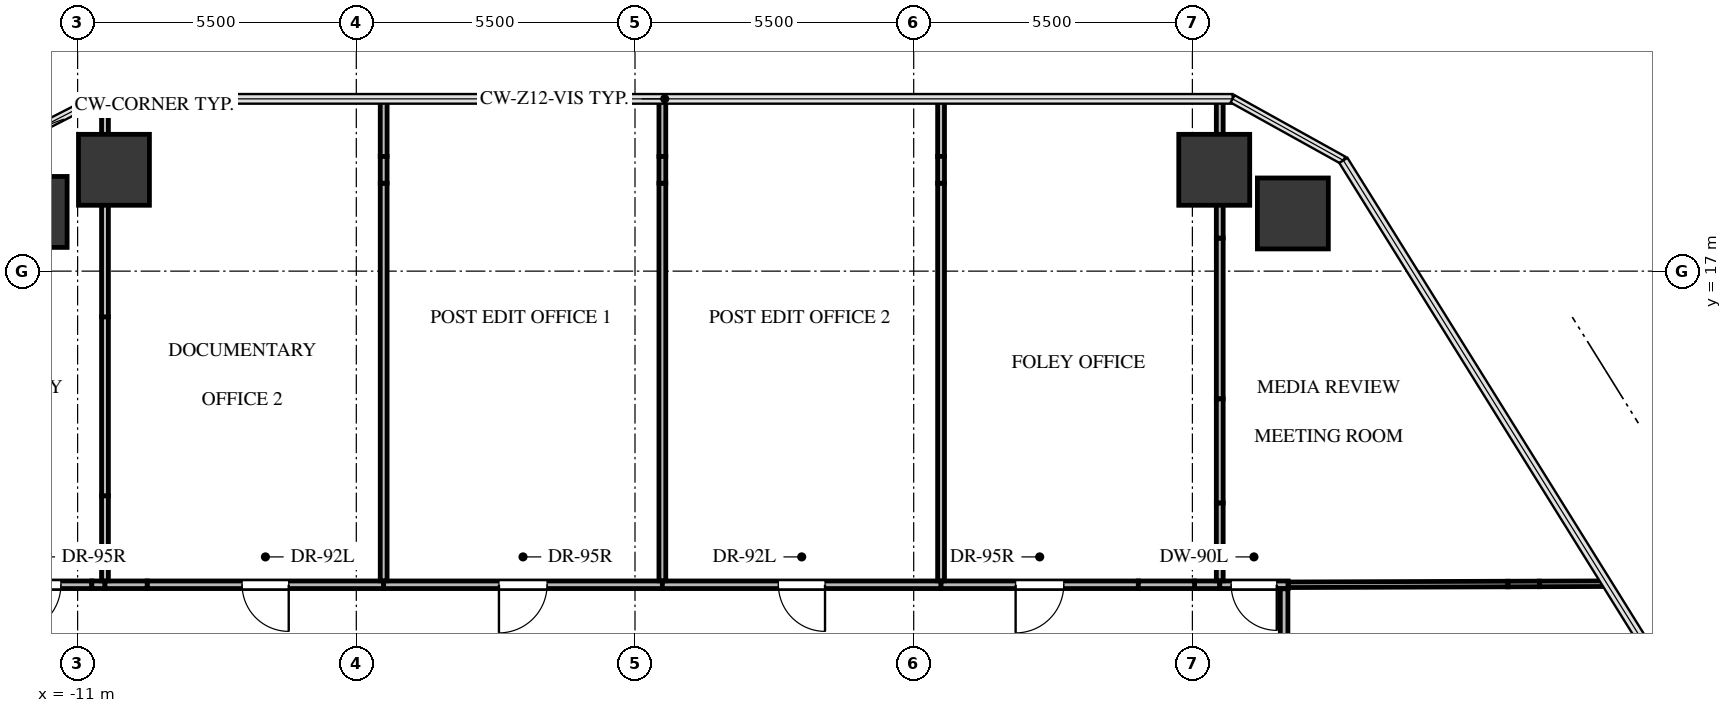
"""IFC4 building model, lengths in metres.
Left out: names, types, materials, properties, quantities, classifications, styles, units other than length and angle.
Written with IfcOpenShell. Run it as: python <this file> out.ifc"""

import sys

from ifc_helpers import new_model, si_unit, direction, frame, frame_2d, origin, origin_2d, place, context, subcontext, project, spatial, rectangle, extrude, source, transform, mapped, element, fill, save


model = new_model("IFC4")
c1 = context("Model", 3, precision=1e-05, world=origin(), true_north=direction((0.0, 1.0)))
c2 = subcontext(c1, "Body", "Model", "MODEL_VIEW")
j1 = project(units=[si_unit("LENGTHUNIT", "METRE"), si_unit("PLANEANGLEUNIT", "RADIAN")], contexts=[c1])
p1 = place(None, origin())
s1 = spatial("IfcSite", under=j1, at=p1, CompositionType="ELEMENT")
p2 = place(p1, origin())
s2 = spatial("IfcBuilding", under=s1, at=p2, CompositionType="ELEMENT")
p3 = place(p2, frame((0.0, 0.0, 75.3)))
s3 = spatial("IfcBuildingStorey", under=s2, at=p3, CompositionType="ELEMENT", Elevation=75.3)
m1 = source(origin(), c2, "Body", "SweptSolid", [
    extrude(rectangle(XDim=1.4, YDim=1.4, at=origin_2d()), origin(), (0.0, 0.0, 1.0), 3.0),
])
for number, where, z_axis, x_axis in (
    (1, (-11.907, 18.168, -0.24), (0.0, 0.0, 1.0), (1.0, 0.0, 0.0)),
    (2, (-10.283, 19.0, -0.24), (0.0, 0.0, 1.0), (1.0, 0.0, 0.0)),
    (3, (11.431, 19.0, -0.24), (0.0, 0.0, 1.0), (1.0, 0.0, 0.0)),
    (4, (12.983, 18.138, -0.24), (0.0, 0.0, 1.0), (1.0, 0.0, 0.0)),
):
    element("IfcColumn", number, at=place(p3, frame(where, z_axis=z_axis, x_axis=x_axis)), inside=s3, PredefinedType="COLUMN", context=c2, shape_type="MappedRepresentation", body=[
        mapped(m1, transform((0.0, 0.0, 0.0), x_axis=(1.0, 0.0, 0.0), y_axis=(0.0, 1.0, 0.0), z_axis=(0.0, 0.0, 1.0), scale=1.0)),
    ])
p4 = place(p3, frame((-10.72, 10.81, 0.0), z_axis=(0.0, 0.0, 1.0), x_axis=(-1.0, 0.0, 0.0)))
e5 = element("IfcWall", 5, at=p4, inside=s3, PredefinedType="PARTITIONING", context=c2, shape_type="SweptSolid", body=[
    extrude(rectangle(XDim=2.17, YDim=0.15, at=frame_2d((1.085, 0.0))), origin(), (0.0, 0.0, 1.0), 2.745),
])
p5 = place(p4, frame((0.61, 0.0, 0.0)))
e6 = element("IfcOpeningElement", 6, at=p5, cuts=e5, PredefinedType="OPENING", context=c2, shape_type="SweptSolid", body=[
    extrude(rectangle(XDim=0.95, YDim=2.1, at=frame_2d((0.475, 1.05))), frame((0.0, 0.085, 0.0), z_axis=(0.0, -1.0, 0.0), x_axis=(1.0, 0.0, 0.0)), (0.0, 0.0, 1.0), 0.17),
])
p6 = place(p3, frame((-10.46, 10.81, 0.0), z_axis=(0.0, 0.0, 1.0), x_axis=(-1.0, 0.0, 0.0)))
e7 = element("IfcWall", 7, at=p6, inside=s3, PredefinedType="PARTITIONING", context=c2, shape_type="SweptSolid", body=[
    extrude(rectangle(XDim=0.26, YDim=0.15, at=frame_2d((0.13, 0.0))), origin(), (0.0, 0.0, 1.0), 1.83),
])
p7 = place(p3, frame((-4.96, 10.81, 0.0), z_axis=(0.0, 0.0, 1.0), x_axis=(-1.0, 0.0, 0.0)))
e8 = element("IfcWall", 8, at=p7, inside=s3, PredefinedType="PARTITIONING", context=c2, shape_type="SweptSolid", body=[
    extrude(rectangle(XDim=4.667, YDim=0.15, at=frame_2d((2.334, 0.0))), origin(), (0.0, 0.0, 1.0), 2.298),
])
p8 = place(p7, frame((1.874, 0.0, 0.0)))
e9 = element("IfcOpeningElement", 9, at=p8, cuts=e8, PredefinedType="OPENING", context=c2, shape_type="SweptSolid", body=[
    extrude(rectangle(XDim=0.92, YDim=2.1, at=frame_2d((0.46, 1.05))), frame((0.0, 0.085, 0.0), z_axis=(0.0, -1.0, 0.0), x_axis=(1.0, 0.0, 0.0)), (0.0, 0.0, 1.0), 0.17),
])
p9 = place(p3, frame((-9.627, 10.81, 0.0), z_axis=(0.0, 0.0, 1.0), x_axis=(-1.0, 0.0, 0.0)))
e10 = element("IfcWall", 10, at=p9, inside=s3, PredefinedType="PARTITIONING", context=c2, shape_type="SweptSolid", body=[
    extrude(rectangle(XDim=0.833, YDim=0.15, at=frame_2d((0.416, 0.0))), origin(), (0.0, 0.0, 1.0), 1.83),
])
p10 = place(p3, frame((0.54, 10.81, 0.0), z_axis=(0.0, 0.0, 1.0), x_axis=(-1.0, 0.0, 0.0)))
e11 = element("IfcWall", 11, at=p10, inside=s3, PredefinedType="PARTITIONING", context=c2, shape_type="SweptSolid", body=[
    extrude(rectangle(XDim=5.5, YDim=0.15, at=frame_2d((2.75, 0.0))), origin(), (0.0, 0.0, 1.0), 2.745),
])
p11 = place(p10, frame((2.275, 0.0, 0.0)))
e12 = element("IfcOpeningElement", 12, at=p11, cuts=e11, PredefinedType="OPENING", context=c2, shape_type="SweptSolid", body=[
    extrude(rectangle(XDim=0.95, YDim=2.1, at=frame_2d((0.475, 1.05))), frame((0.0, 0.085, 0.0), z_axis=(0.0, -1.0, 0.0), x_axis=(1.0, 0.0, 0.0)), (0.0, 0.0, 1.0), 0.17),
])
p12 = place(p3, frame((6.04, 10.81, 0.0), z_axis=(0.0, 0.0, 1.0), x_axis=(-1.0, 0.0, 0.0)))
e13 = element("IfcWall", 13, at=p12, inside=s3, PredefinedType="PARTITIONING", context=c2, shape_type="SweptSolid", body=[
    extrude(rectangle(XDim=5.5, YDim=0.15, at=frame_2d((2.75, 0.0))), origin(), (0.0, 0.0, 1.0), 2.298),
])
p13 = place(p12, frame((2.29, 0.0, 0.0)))
e14 = element("IfcOpeningElement", 14, at=p13, cuts=e13, PredefinedType="OPENING", context=c2, shape_type="SweptSolid", body=[
    extrude(rectangle(XDim=0.92, YDim=2.1, at=frame_2d((0.46, 1.05))), frame((0.0, 0.085, 0.0), z_axis=(0.0, -1.0, 0.0), x_axis=(1.0, 0.0, 0.0)), (0.0, 0.0, 1.0), 0.17),
])
p14 = place(p3, frame((11.54, 10.81, 0.0), z_axis=(0.0, 0.0, 1.0), x_axis=(-1.0, 0.0, 0.0)))
e15 = element("IfcWall", 15, at=p14, inside=s3, PredefinedType="PARTITIONING", context=c2, shape_type="SweptSolid", body=[
    extrude(rectangle(XDim=0.498, YDim=0.15, at=frame_2d((0.249, 0.0))), origin(), (0.0, 0.0, 1.0), 2.745),
])
p15 = place(p3, frame((9.933, 10.81, 0.0), z_axis=(0.0, 0.0, 1.0), x_axis=(-1.0, 0.0, 0.0)))
e16 = element("IfcWall", 16, at=p15, inside=s3, PredefinedType="PARTITIONING", context=c2, shape_type="SweptSolid", body=[
    extrude(rectangle(XDim=3.893, YDim=0.15, at=frame_2d((1.947, 0.0))), origin(), (0.0, 0.0, 1.0), 2.745),
])
p16 = place(p15, frame((1.472, 0.0, 0.0)))
e17 = element("IfcOpeningElement", 17, at=p16, cuts=e16, PredefinedType="OPENING", context=c2, shape_type="SweptSolid", body=[
    extrude(rectangle(XDim=0.95, YDim=2.1, at=frame_2d((0.475, 1.05))), frame((0.0, 0.085, 0.0), z_axis=(0.0, -1.0, 0.0), x_axis=(1.0, 0.0, 0.0)), (0.0, 0.0, 1.0), 0.17),
])
p17 = place(p3, frame((11.042, 10.81, 0.0), z_axis=(0.0, 0.0, 1.0), x_axis=(-1.0, 0.0, 0.0)))
e18 = element("IfcWall", 18, at=p17, inside=s3, PredefinedType="PARTITIONING", context=c2, shape_type="SweptSolid", body=[
    extrude(rectangle(XDim=1.109, YDim=0.15, at=frame_2d((0.555, 0.0))), origin(), (0.0, 0.0, 1.0), 1.83),
])
p18 = place(p3, frame((12.89, 10.81, 0.0), z_axis=(0.0, 0.0, 1.0), x_axis=(-1.0, 0.0, 0.0)))
e19 = element("IfcWall", 19, at=p18, inside=s3, PredefinedType="PARTITIONING", context=c2, shape_type="SweptSolid", body=[
    extrude(rectangle(XDim=1.35, YDim=0.15, at=frame_2d((0.675, 0.0))), origin(), (0.0, 0.0, 1.0), 2.745),
])
p19 = place(p18, frame((0.225, 0.0, 0.0)))
e20 = element("IfcOpeningElement", 20, at=p19, cuts=e19, PredefinedType="OPENING", context=c2, shape_type="SweptSolid", body=[
    extrude(rectangle(XDim=0.9, YDim=2.05, at=frame_2d((0.45, 1.025))), frame((0.0, 0.085, 0.0), z_axis=(0.0, -1.0, 0.0), x_axis=(1.0, 0.0, 0.0)), (0.0, 0.0, 1.0), 0.17),
])
p20 = place(p3, frame((12.81, 4.54, 0.0), z_axis=(0.0, 0.0, 1.0), x_axis=(0.0, 1.0, 0.0)))
e21 = element("IfcWall", 21, at=p20, inside=s3, PredefinedType="PARTITIONING", context=c2, shape_type="SweptSolid", body=[
    extrude(rectangle(XDim=6.191, YDim=0.15, at=frame_2d((3.095, 0.0))), origin(), (0.0, 0.0, 1.0), 2.745),
])
p21 = place(p20, frame((2.646, 0.0, 0.0)))
e22 = element("IfcOpeningElement", 22, at=p21, cuts=e21, PredefinedType="OPENING", context=c2, shape_type="SweptSolid", body=[
    extrude(rectangle(XDim=0.9, YDim=2.05, at=frame_2d((0.45, 1.025))), frame((0.0, 0.085, 0.0), z_axis=(0.0, -1.0, 0.0), x_axis=(1.0, 0.0, 0.0)), (0.0, 0.0, 1.0), 0.17),
])
p22 = place(p3, frame((-10.46, 16.098, 0.0), z_axis=(0.0, 0.0, 1.0), x_axis=(0.0, -1.0, 0.0)))
e23 = element("IfcWall", 23, at=p22, inside=s3, PredefinedType="PARTITIONING", context=c2, shape_type="SweptSolid", body=[
    extrude(rectangle(XDim=3.535, YDim=0.135, at=frame_2d((1.768, 0.0))), origin(), (0.0, 0.0, 1.0), 1.83),
])
p23 = place(p3, frame((-10.46, 20.4, 0.0), z_axis=(0.0, 0.0, 1.0), x_axis=(0.0, -1.0, 0.0)))
e24 = element("IfcWall", 24, at=p23, inside=s3, PredefinedType="PARTITIONING", context=c2, shape_type="SweptSolid", body=[
    extrude(rectangle(XDim=4.302, YDim=0.135, at=frame_2d((2.151, 0.0))), origin(), (0.0, 0.0, 1.0), 1.577),
])
p24 = place(p3, frame((-10.46, 12.563, 0.0), z_axis=(0.0, 0.0, 1.0), x_axis=(0.0, -1.0, 0.0)))
e25 = element("IfcWall", 25, at=p24, inside=s3, PredefinedType="PARTITIONING", context=c2, shape_type="SweptSolid", body=[
    extrude(rectangle(XDim=1.675, YDim=0.135, at=frame_2d((0.837, 0.0))), origin(), (0.0, 0.0, 1.0), 1.83),
])
p25 = place(p3, frame((-4.96, 20.4, 0.0), z_axis=(0.0, 0.0, 1.0), x_axis=(0.0, -1.0, 0.0)))
e26 = element("IfcWall", 26, at=p25, inside=s3, PredefinedType="PARTITIONING", context=c2, shape_type="SweptSolid", body=[
    extrude(rectangle(XDim=1.135, YDim=0.135, at=frame_2d((0.568, 0.0))), origin(), (0.0, 0.0, 1.0), 2.745),
])
p26 = place(p3, frame((-4.96, 18.736, 0.0), z_axis=(0.0, 0.0, 1.0), x_axis=(0.0, -1.0, 0.0)))
e27 = element("IfcWall", 27, at=p26, inside=s3, PredefinedType="PARTITIONING", context=c2, shape_type="SweptSolid", body=[
    extrude(rectangle(XDim=7.847, YDim=0.135, at=frame_2d((3.923, 0.0))), origin(), (0.0, 0.0, 1.0), 2.745),
])
p27 = place(p3, frame((-4.96, 19.264, 0.0), z_axis=(0.0, 0.0, 1.0), x_axis=(0.0, -1.0, 0.0)))
e28 = element("IfcWall", 28, at=p27, inside=s3, PredefinedType="PARTITIONING", context=c2, shape_type="SweptSolid", body=[
    extrude(rectangle(XDim=0.529, YDim=0.135, at=frame_2d((0.264, 0.0))), origin(), (0.0, 0.0, 1.0), 2.08),
])
p28 = place(p3, frame((0.54, 20.4, 0.0), z_axis=(0.0, 0.0, 1.0), x_axis=(0.0, -1.0, 0.0)))
e29 = element("IfcWall", 29, at=p28, inside=s3, PredefinedType="PARTITIONING", context=c2, shape_type="SweptSolid", body=[
    extrude(rectangle(XDim=1.135, YDim=0.135, at=frame_2d((0.568, 0.0))), origin(), (0.0, 0.0, 1.0), 2.745),
])
p29 = place(p3, frame((0.54, 18.736, 0.0), z_axis=(0.0, 0.0, 1.0), x_axis=(0.0, -1.0, 0.0)))
e30 = element("IfcWall", 30, at=p29, inside=s3, PredefinedType="PARTITIONING", context=c2, shape_type="SweptSolid", body=[
    extrude(rectangle(XDim=7.847, YDim=0.135, at=frame_2d((3.923, 0.0))), origin(), (0.0, 0.0, 1.0), 2.745),
])
p30 = place(p3, frame((0.54, 19.264, 0.0), z_axis=(0.0, 0.0, 1.0), x_axis=(0.0, -1.0, 0.0)))
e31 = element("IfcWall", 31, at=p30, inside=s3, PredefinedType="PARTITIONING", context=c2, shape_type="SweptSolid", body=[
    extrude(rectangle(XDim=0.529, YDim=0.135, at=frame_2d((0.264, 0.0))), origin(), (0.0, 0.0, 1.0), 2.08),
])
p31 = place(p3, frame((6.04, 20.4, 0.0), z_axis=(0.0, 0.0, 1.0), x_axis=(0.0, -1.0, 0.0)))
e32 = element("IfcWall", 32, at=p31, inside=s3, PredefinedType="PARTITIONING", context=c2, shape_type="SweptSolid", body=[
    extrude(rectangle(XDim=1.135, YDim=0.135, at=frame_2d((0.568, 0.0))), origin(), (0.0, 0.0, 1.0), 2.745),
])
p32 = place(p3, frame((6.04, 18.736, 0.0), z_axis=(0.0, 0.0, 1.0), x_axis=(0.0, -1.0, 0.0)))
e33 = element("IfcWall", 33, at=p32, inside=s3, PredefinedType="PARTITIONING", context=c2, shape_type="SweptSolid", body=[
    extrude(rectangle(XDim=7.847, YDim=0.135, at=frame_2d((3.923, 0.0))), origin(), (0.0, 0.0, 1.0), 2.745),
])
p33 = place(p3, frame((6.04, 19.264, 0.0), z_axis=(0.0, 0.0, 1.0), x_axis=(0.0, -1.0, 0.0)))
e34 = element("IfcWall", 34, at=p33, inside=s3, PredefinedType="PARTITIONING", context=c2, shape_type="SweptSolid", body=[
    extrude(rectangle(XDim=0.529, YDim=0.135, at=frame_2d((0.264, 0.0))), origin(), (0.0, 0.0, 1.0), 2.08),
])
p34 = place(p3, frame((11.54, 17.652, 0.0), z_axis=(0.0, 0.0, 1.0), x_axis=(0.0, -1.0, 0.0)))
e35 = element("IfcWall", 35, at=p34, inside=s3, PredefinedType="PARTITIONING", context=c2, shape_type="SweptSolid", body=[
    extrude(rectangle(XDim=3.173, YDim=0.135, at=frame_2d((1.586, 0.0))), origin(), (0.0, 0.0, 1.0), 1.83),
])
p35 = place(p3, frame((11.54, 12.426, 0.0), z_axis=(0.0, 0.0, 1.0), x_axis=(0.0, -1.0, 0.0)))
e36 = element("IfcWall", 36, at=p35, inside=s3, PredefinedType="PARTITIONING", context=c2, shape_type="SweptSolid", body=[
    extrude(rectangle(XDim=1.537, YDim=0.135, at=frame_2d((0.768, 0.0))), origin(), (0.0, 0.0, 1.0), 1.83),
])
p36 = place(p3, frame((11.54, 20.4, 0.0), z_axis=(0.0, 0.0, 1.0), x_axis=(0.0, -1.0, 0.0)))
e37 = element("IfcWall", 37, at=p36, inside=s3, PredefinedType="PARTITIONING", context=c2, shape_type="SweptSolid", body=[
    extrude(rectangle(XDim=2.748, YDim=0.135, at=frame_2d((1.374, 0.0))), origin(), (0.0, 0.0, 1.0), 1.577),
])
p37 = place(p3, frame((11.54, 14.479, 0.0), z_axis=(0.0, 0.0, 1.0), x_axis=(0.0, -1.0, 0.0)))
e38 = element("IfcWall", 38, at=p37, inside=s3, PredefinedType="PARTITIONING", context=c2, shape_type="SweptSolid", body=[
    extrude(rectangle(XDim=2.053, YDim=0.135, at=frame_2d((1.026, 0.0))), origin(), (0.0, 0.0, 1.0), 1.83),
])
p38 = place(p3, frame((19.182, 10.831, 0.0), z_axis=(0.0, 0.0, 1.0), x_axis=(-0.999994579825, -0.00329246432, 0.0)))
e39 = element("IfcWall", 39, at=p38, inside=s3, PredefinedType="MOVABLE", context=c2, shape_type="SweptSolid", body=[
    extrude(rectangle(XDim=1.335, YDim=0.11, at=frame_2d((0.667, 0.0))), origin(), (0.0, 0.0, 1.0), 2.745),
])
p39 = place(p3, frame((17.225, 10.825, 0.0), z_axis=(0.0, 0.0, 1.0), x_axis=(-0.999994480721, -0.003322427884, 0.0)))
e40 = element("IfcWall", 40, at=p39, inside=s3, PredefinedType="MOVABLE", context=c2, shape_type="SweptSolid", body=[
    extrude(rectangle(XDim=4.335, YDim=0.11, at=frame_2d((2.168, 0.0))), origin(), (0.0, 0.0, 1.0), 2.745),
])
p40 = place(p3, frame((17.847, 10.827, 0.0), z_axis=(0.0, 0.0, 1.0), x_axis=(-0.999993761903, -0.00353216007, 0.0)))
e41 = element("IfcWall", 41, at=p40, inside=s3, PredefinedType="MOVABLE", context=c2, shape_type="SweptSolid", body=[
    extrude(rectangle(XDim=0.622, YDim=0.11, at=frame_2d((0.311, 0.0))), origin(), (0.0, 0.0, 1.0), 2.08),
])
m2 = source(origin(), c2, "Body", "SweptSolid", [
    extrude(rectangle(XDim=0.95, YDim=2.1, at=frame_2d((0.475, 1.05))), frame((0.0, 0.025, 0.0), z_axis=(0.0, -1.0, 0.0), x_axis=(1.0, 0.0, 0.0)), (0.0, 0.0, 1.0), 0.05),
])
p41 = place(p5, origin())
e42 = element("IfcDoor", 42, at=p41, inside=s3, OperationType="SINGLE_SWING_RIGHT", PredefinedType="DOOR", context=c2, shape_type="MappedRepresentation", body=[
    mapped(m2, transform((0.0, 0.0, 0.0), x_axis=(1.0, 0.0, 0.0), y_axis=(0.0, 1.0, 0.0), z_axis=(0.0, 0.0, 1.0), scale=1.0)),
])
fill(e6, e42)
m3 = source(origin(), c2, "Body", "SweptSolid", [
    extrude(rectangle(XDim=0.92, YDim=2.1, at=frame_2d((0.46, 1.05))), frame((0.0, 0.025, 0.0), z_axis=(0.0, -1.0, 0.0), x_axis=(1.0, 0.0, 0.0)), (0.0, 0.0, 1.0), 0.05),
])
p42 = place(p8, origin())
e43 = element("IfcDoor", 43, at=p42, inside=s3, OperationType="SINGLE_SWING_LEFT", PredefinedType="DOOR", context=c2, shape_type="MappedRepresentation", body=[
    mapped(m3, transform((0.0, 0.0, 0.0), x_axis=(1.0, 0.0, 0.0), y_axis=(0.0, 1.0, 0.0), z_axis=(0.0, 0.0, 1.0), scale=1.0)),
])
fill(e9, e43)
p43 = place(p11, origin())
e44 = element("IfcDoor", 44, at=p43, inside=s3, OperationType="SINGLE_SWING_RIGHT", PredefinedType="DOOR", context=c2, shape_type="MappedRepresentation", body=[
    mapped(m2, transform((0.0, 0.0, 0.0), x_axis=(1.0, 0.0, 0.0), y_axis=(0.0, 1.0, 0.0), z_axis=(0.0, 0.0, 1.0), scale=1.0)),
])
fill(e12, e44)
p44 = place(p13, origin())
e45 = element("IfcDoor", 45, at=p44, inside=s3, OperationType="SINGLE_SWING_LEFT", PredefinedType="DOOR", context=c2, shape_type="MappedRepresentation", body=[
    mapped(m3, transform((0.0, 0.0, 0.0), x_axis=(1.0, 0.0, 0.0), y_axis=(0.0, 1.0, 0.0), z_axis=(0.0, 0.0, 1.0), scale=1.0)),
])
fill(e14, e45)
p45 = place(p16, origin())
e46 = element("IfcDoor", 46, at=p45, inside=s3, OperationType="SINGLE_SWING_RIGHT", PredefinedType="DOOR", context=c2, shape_type="MappedRepresentation", body=[
    mapped(m2, transform((0.0, 0.0, 0.0), x_axis=(1.0, 0.0, 0.0), y_axis=(0.0, 1.0, 0.0), z_axis=(0.0, 0.0, 1.0), scale=1.0)),
])
fill(e17, e46)
m4 = source(origin(), c2, "Body", "SweptSolid", [
    extrude(rectangle(XDim=0.9, YDim=2.05, at=frame_2d((0.45, 1.025))), frame((0.0, 0.025, 0.0), z_axis=(0.0, -1.0, 0.0), x_axis=(1.0, 0.0, 0.0)), (0.0, 0.0, 1.0), 0.05),
])
p46 = place(p19, origin())
e47 = element("IfcDoor", 47, at=p46, inside=s3, OperationType="SINGLE_SWING_LEFT", PredefinedType="DOOR", context=c2, shape_type="MappedRepresentation", body=[
    mapped(m4, transform((0.0, 0.0, 0.0), x_axis=(1.0, 0.0, 0.0), y_axis=(0.0, 1.0, 0.0), z_axis=(0.0, 0.0, 1.0), scale=1.0)),
])
fill(e20, e47)
save(model, sys.argv[1])
